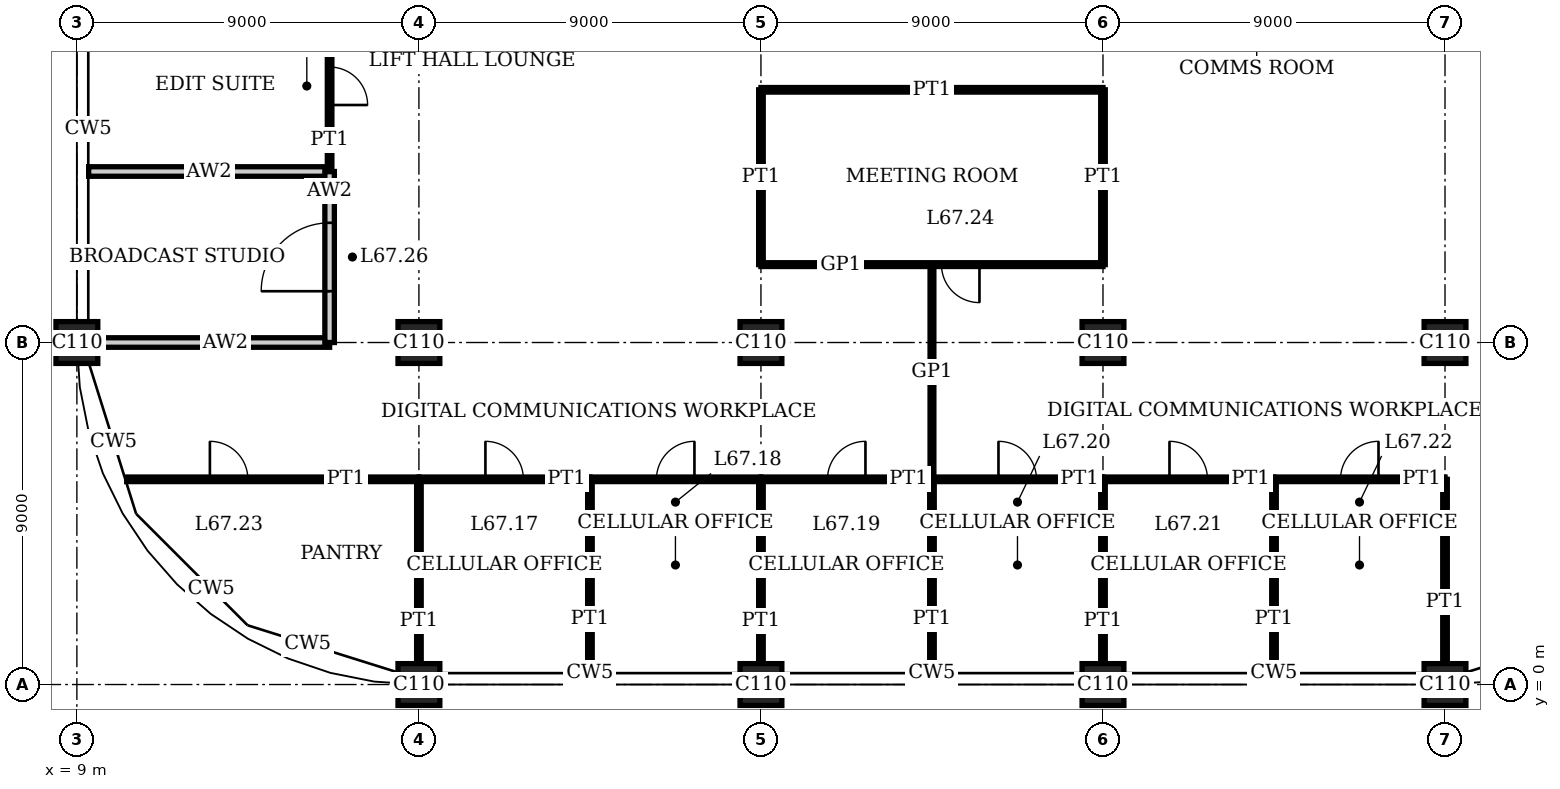
"""IFC4 building model, lengths in metres.
Left out: names, types, materials, properties, quantities, classifications, styles, units other than length and angle.
Written with IfcOpenShell. Run it as: python <this file> out.ifc"""

import sys

from ifc_helpers import new_model, si_unit, direction, frame, frame_2d, origin, origin_2d, place, context, subcontext, project, spatial, rectangle, extrude, element, fill, save


model = new_model("IFC4")
c1 = context("Model", 3, precision=1e-05, world=origin(), true_north=direction((0.0, 1.0)))
c2 = subcontext(c1, "Body", "Model", "MODEL_VIEW")
j1 = project(units=[si_unit("LENGTHUNIT", "METRE"), si_unit("PLANEANGLEUNIT", "RADIAN")], contexts=[c1])
p1 = place(None, origin())
s1 = spatial("IfcSite", under=j1, at=p1, CompositionType="ELEMENT")
p2 = place(p1, origin())
s2 = spatial("IfcBuilding", under=s1, at=p2, CompositionType="ELEMENT")
p3 = place(p2, frame((0.0, 0.0, 275.4)))
s3 = spatial("IfcBuildingStorey", under=s2, at=p3, CompositionType="ELEMENT", Elevation=275.4)
for number, where, z_axis, x_axis in (
    (1, (9.0, 9.0, 0.0), (0.0, 0.0, 1.0), (1.0, 0.0, 0.0)),
    (2, (18.0, 0.0, 0.0), (0.0, 0.0, 1.0), (1.0, 0.0, 0.0)),
    (3, (18.0, 9.0, 0.0), (0.0, 0.0, 1.0), (1.0, 0.0, 0.0)),
    (4, (27.0, 0.0, 0.0), (0.0, 0.0, 1.0), (1.0, 0.0, 0.0)),
    (5, (27.0, 9.0, 0.0), (0.0, 0.0, 1.0), (1.0, 0.0, 0.0)),
    (6, (36.0, 0.0, 0.0), (0.0, 0.0, 1.0), (1.0, 0.0, 0.0)),
    (7, (36.0, 9.0, 0.0), (0.0, 0.0, 1.0), (1.0, 0.0, 0.0)),
    (8, (45.0, 0.0, 0.0), (0.0, 0.0, 1.0), (1.0, 0.0, 0.0)),
    (9, (45.0, 9.0, 0.0), (0.0, 0.0, 1.0), (1.0, 0.0, 0.0)),
):
    element("IfcColumn", number, at=place(p3, frame(where, z_axis=z_axis, x_axis=x_axis)), inside=s3, PredefinedType="COLUMN", context=c2, shape_type="SweptSolid", body=[
        extrude(rectangle(XDim=1.1, YDim=1.1, at=origin_2d()), origin(), (0.0, 0.0, 1.0), 4.0),
    ])
p4 = place(p3, frame((18.0, 5.4, 0.0), z_axis=(0.0, 0.0, 1.0), x_axis=(1.0, 0.0, 0.0)))
e10 = element("IfcWall", 10, at=p4, inside=s3, PredefinedType="PARTITIONING", context=c2, shape_type="SweptSolid", body=[
    extrude(rectangle(XDim=4.5, YDim=0.12, at=frame_2d((2.25, 0.0))), origin(), (0.0, 0.0, 1.0), 3.75),
])
p5 = place(p4, frame((1.75, 0.0, 0.0)))
e11 = element("IfcOpeningElement", 11, at=p5, cuts=e10, PredefinedType="OPENING", context=c2, shape_type="SweptSolid", body=[
    extrude(rectangle(XDim=1.0, YDim=2.4, at=frame_2d((0.5, 1.2))), frame((0.0, 0.07, 0.0), z_axis=(0.0, -1.0, 0.0), x_axis=(1.0, 0.0, 0.0)), (0.0, 0.0, 1.0), 0.14),
])
p6 = place(p3, frame((22.5, 5.4, 0.0), z_axis=(0.0, 0.0, 1.0), x_axis=(1.0, 0.0, 0.0)))
e12 = element("IfcWall", 12, at=p6, inside=s3, PredefinedType="PARTITIONING", context=c2, shape_type="SweptSolid", body=[
    extrude(rectangle(XDim=4.5, YDim=0.12, at=frame_2d((2.25, 0.0))), origin(), (0.0, 0.0, 1.0), 3.75),
])
p7 = place(p6, frame((1.75, 0.0, 0.0)))
e13 = element("IfcOpeningElement", 13, at=p7, cuts=e12, PredefinedType="OPENING", context=c2, shape_type="SweptSolid", body=[
    extrude(rectangle(XDim=1.0, YDim=2.4, at=frame_2d((0.5, 1.2))), frame((0.0, 0.07, 0.0), z_axis=(0.0, -1.0, 0.0), x_axis=(1.0, 0.0, 0.0)), (0.0, 0.0, 1.0), 0.14),
])
p8 = place(p3, frame((27.0, 5.4, 0.0), z_axis=(0.0, 0.0, 1.0), x_axis=(1.0, 0.0, 0.0)))
e14 = element("IfcWall", 14, at=p8, inside=s3, PredefinedType="PARTITIONING", context=c2, shape_type="SweptSolid", body=[
    extrude(rectangle(XDim=4.5, YDim=0.12, at=frame_2d((2.25, 0.0))), origin(), (0.0, 0.0, 1.0), 3.75),
])
p9 = place(p8, frame((1.75, 0.0, 0.0)))
e15 = element("IfcOpeningElement", 15, at=p9, cuts=e14, PredefinedType="OPENING", context=c2, shape_type="SweptSolid", body=[
    extrude(rectangle(XDim=1.0, YDim=2.4, at=frame_2d((0.5, 1.2))), frame((0.0, 0.07, 0.0), z_axis=(0.0, -1.0, 0.0), x_axis=(1.0, 0.0, 0.0)), (0.0, 0.0, 1.0), 0.14),
])
p10 = place(p3, frame((31.5, 5.4, 0.0), z_axis=(0.0, 0.0, 1.0), x_axis=(1.0, 0.0, 0.0)))
e16 = element("IfcWall", 16, at=p10, inside=s3, PredefinedType="PARTITIONING", context=c2, shape_type="SweptSolid", body=[
    extrude(rectangle(XDim=4.5, YDim=0.12, at=frame_2d((2.25, 0.0))), origin(), (0.0, 0.0, 1.0), 3.75),
])
p11 = place(p10, frame((1.75, 0.0, 0.0)))
e17 = element("IfcOpeningElement", 17, at=p11, cuts=e16, PredefinedType="OPENING", context=c2, shape_type="SweptSolid", body=[
    extrude(rectangle(XDim=1.0, YDim=2.4, at=frame_2d((0.5, 1.2))), frame((0.0, 0.07, 0.0), z_axis=(0.0, -1.0, 0.0), x_axis=(1.0, 0.0, 0.0)), (0.0, 0.0, 1.0), 0.14),
])
p12 = place(p3, frame((36.0, 5.4, 0.0), z_axis=(0.0, 0.0, 1.0), x_axis=(1.0, 0.0, 0.0)))
e18 = element("IfcWall", 18, at=p12, inside=s3, PredefinedType="PARTITIONING", context=c2, shape_type="SweptSolid", body=[
    extrude(rectangle(XDim=4.5, YDim=0.12, at=frame_2d((2.25, 0.0))), origin(), (0.0, 0.0, 1.0), 3.75),
])
p13 = place(p12, frame((1.75, 0.0, 0.0)))
e19 = element("IfcOpeningElement", 19, at=p13, cuts=e18, PredefinedType="OPENING", context=c2, shape_type="SweptSolid", body=[
    extrude(rectangle(XDim=1.0, YDim=2.4, at=frame_2d((0.5, 1.2))), frame((0.0, 0.07, 0.0), z_axis=(0.0, -1.0, 0.0), x_axis=(1.0, 0.0, 0.0)), (0.0, 0.0, 1.0), 0.14),
])
p14 = place(p3, frame((40.5, 5.4, 0.0), z_axis=(0.0, 0.0, 1.0), x_axis=(1.0, 0.0, 0.0)))
e20 = element("IfcWall", 20, at=p14, inside=s3, PredefinedType="PARTITIONING", context=c2, shape_type="SweptSolid", body=[
    extrude(rectangle(XDim=4.5, YDim=0.12, at=frame_2d((2.25, 0.0))), origin(), (0.0, 0.0, 1.0), 3.75),
])
p15 = place(p14, frame((1.75, 0.0, 0.0)))
e21 = element("IfcOpeningElement", 21, at=p15, cuts=e20, PredefinedType="OPENING", context=c2, shape_type="SweptSolid", body=[
    extrude(rectangle(XDim=1.0, YDim=2.4, at=frame_2d((0.5, 1.2))), frame((0.0, 0.07, 0.0), z_axis=(0.0, -1.0, 0.0), x_axis=(1.0, 0.0, 0.0)), (0.0, 0.0, 1.0), 0.14),
])
p16 = place(p3, frame((10.31, 5.4, 0.0), z_axis=(0.0, 0.0, 1.0), x_axis=(1.0, 0.0, 0.0)))
e22 = element("IfcWall", 22, at=p16, inside=s3, PredefinedType="PARTITIONING", context=c2, shape_type="SweptSolid", body=[
    extrude(rectangle(XDim=7.69, YDim=0.12, at=frame_2d((3.845, 0.0))), origin(), (0.0, 0.0, 1.0), 3.75),
])
p17 = place(p16, frame((2.19, 0.0, 0.0)))
e23 = element("IfcOpeningElement", 23, at=p17, cuts=e22, PredefinedType="OPENING", context=c2, shape_type="SweptSolid", body=[
    extrude(rectangle(XDim=1.0, YDim=2.4, at=frame_2d((0.5, 1.2))), frame((0.0, 0.07, 0.0), z_axis=(0.0, -1.0, 0.0), x_axis=(1.0, 0.0, 0.0)), (0.0, 0.0, 1.0), 0.14),
])
p18 = place(p3, frame((9.55, 9.0, 0.0), z_axis=(0.0, 0.0, 1.0), x_axis=(1.0, 0.0, 0.0)))
e24 = element("IfcWall", 24, at=p18, inside=s3, PredefinedType="PARTITIONING", context=c2, shape_type="SweptSolid", body=[
    extrude(rectangle(XDim=6.1, YDim=0.25, at=frame_2d((3.05, 0.0))), origin(), (0.0, 0.0, 1.0), 3.05),
])
p19 = place(p3, frame((27.0, 11.05, 0.0), z_axis=(0.0, 0.0, 1.0), x_axis=(1.0, 0.0, 0.0)))
e25 = element("IfcWall", 25, at=p19, inside=s3, PredefinedType="PARTITIONING", context=c2, shape_type="SweptSolid", body=[
    extrude(rectangle(XDim=9.0, YDim=0.1, at=frame_2d((4.5, 0.0))), origin(), (0.0, 0.0, 1.0), 3.75),
])
p20 = place(p19, frame((4.75, 0.0, 0.0)))
e26 = element("IfcOpeningElement", 26, at=p20, cuts=e25, PredefinedType="OPENING", context=c2, shape_type="SweptSolid", body=[
    extrude(rectangle(XDim=1.0, YDim=2.4, at=frame_2d((0.5, 1.2))), frame((0.0, 0.06, 0.0), z_axis=(0.0, -1.0, 0.0), x_axis=(1.0, 0.0, 0.0)), (0.0, 0.0, 1.0), 0.12),
])
p21 = place(p3, frame((9.31, 13.5, 0.0), z_axis=(0.0, 0.0, 1.0), x_axis=(1.0, 0.0, 0.0)))
e27 = element("IfcWall", 27, at=p21, inside=s3, PredefinedType="PARTITIONING", context=c2, shape_type="SweptSolid", body=[
    extrude(rectangle(XDim=6.34, YDim=0.25, at=frame_2d((3.17, 0.0))), origin(), (0.0, 0.0, 1.0), 3.1),
])
p22 = place(p3, frame((27.0, 15.65, 0.0), z_axis=(0.0, 0.0, 1.0), x_axis=(1.0, 0.0, 0.0)))
e28 = element("IfcWall", 28, at=p22, inside=s3, PredefinedType="PARTITIONING", context=c2, shape_type="SweptSolid", body=[
    extrude(rectangle(XDim=9.0, YDim=0.12, at=frame_2d((4.5, 0.0))), origin(), (0.0, 0.0, 1.0), 3.75),
])
p23 = place(p3, frame((15.65, 9.0, 0.0), z_axis=(0.0, 0.0, 1.0), x_axis=(0.0, 1.0, 0.0)))
e29 = element("IfcWall", 29, at=p23, inside=s3, PredefinedType="PARTITIONING", context=c2, shape_type="SweptSolid", body=[
    extrude(rectangle(XDim=4.5, YDim=0.25, at=frame_2d((2.25, 0.0))), origin(), (0.0, 0.0, 1.0), 3.75),
])
p24 = place(p23, frame((1.35, 0.0, 0.0)))
e30 = element("IfcOpeningElement", 30, at=p24, cuts=e29, PredefinedType="OPENING", context=c2, shape_type="SweptSolid", body=[
    extrude(rectangle(XDim=1.8, YDim=2.4, at=frame_2d((0.9, 1.2))), frame((0.0, 0.135, 0.0), z_axis=(0.0, -1.0, 0.0), x_axis=(1.0, 0.0, 0.0)), (0.0, 0.0, 1.0), 0.27),
])
p25 = place(p3, frame((15.65, 13.5, 0.0), z_axis=(0.0, 0.0, 1.0), x_axis=(0.0, 1.0, 0.0)))
e31 = element("IfcWall", 31, at=p25, inside=s3, PredefinedType="PARTITIONING", context=c2, shape_type="SweptSolid", body=[
    extrude(rectangle(XDim=4.5, YDim=0.12, at=frame_2d((2.25, 0.0))), origin(), (0.0, 0.0, 1.0), 3.75),
])
p26 = place(p25, frame((1.75, 0.0, 0.0)))
e32 = element("IfcOpeningElement", 32, at=p26, cuts=e31, PredefinedType="OPENING", context=c2, shape_type="SweptSolid", body=[
    extrude(rectangle(XDim=1.0, YDim=2.4, at=frame_2d((0.5, 1.2))), frame((0.0, 0.07, 0.0), z_axis=(0.0, -1.0, 0.0), x_axis=(1.0, 0.0, 0.0)), (0.0, 0.0, 1.0), 0.14),
])
p27 = place(p3, frame((18.0, 0.55, 0.0), z_axis=(0.0, 0.0, 1.0), x_axis=(0.0, 1.0, 0.0)))
e33 = element("IfcWall", 33, at=p27, inside=s3, PredefinedType="PARTITIONING", context=c2, shape_type="SweptSolid", body=[
    extrude(rectangle(XDim=4.85, YDim=0.12, at=frame_2d((2.425, 0.0))), origin(), (0.0, 0.0, 1.0), 3.05),
])
p28 = place(p3, frame((22.5, 0.31, 0.0), z_axis=(0.0, 0.0, 1.0), x_axis=(0.0, 1.0, 0.0)))
e34 = element("IfcWall", 34, at=p28, inside=s3, PredefinedType="PARTITIONING", context=c2, shape_type="SweptSolid", body=[
    extrude(rectangle(XDim=5.09, YDim=0.12, at=frame_2d((2.545, 0.0))), origin(), (0.0, 0.0, 1.0), 3.75),
])
p29 = place(p3, frame((27.0, 0.55, 0.0), z_axis=(0.0, 0.0, 1.0), x_axis=(0.0, 1.0, 0.0)))
e35 = element("IfcWall", 35, at=p29, inside=s3, PredefinedType="PARTITIONING", context=c2, shape_type="SweptSolid", body=[
    extrude(rectangle(XDim=4.85, YDim=0.12, at=frame_2d((2.425, 0.0))), origin(), (0.0, 0.0, 1.0), 3.05),
])
p30 = place(p3, frame((27.0, 11.05, 0.0), z_axis=(0.0, 0.0, 1.0), x_axis=(0.0, 1.0, 0.0)))
e36 = element("IfcWall", 36, at=p30, inside=s3, PredefinedType="PARTITIONING", context=c2, shape_type="SweptSolid", body=[
    extrude(rectangle(XDim=4.6, YDim=0.12, at=frame_2d((2.3, 0.0))), origin(), (0.0, 0.0, 1.0), 3.05),
])
p31 = place(p3, frame((31.5, 0.31, 0.0), z_axis=(0.0, 0.0, 1.0), x_axis=(0.0, 1.0, 0.0)))
e37 = element("IfcWall", 37, at=p31, inside=s3, PredefinedType="PARTITIONING", context=c2, shape_type="SweptSolid", body=[
    extrude(rectangle(XDim=5.09, YDim=0.12, at=frame_2d((2.545, 0.0))), origin(), (0.0, 0.0, 1.0), 3.75),
])
p32 = place(p3, frame((31.5, 5.4, 0.0), z_axis=(0.0, 0.0, 1.0), x_axis=(0.0, 1.0, 0.0)))
e38 = element("IfcWall", 38, at=p32, inside=s3, PredefinedType="PARTITIONING", context=c2, shape_type="SweptSolid", body=[
    extrude(rectangle(XDim=5.66, YDim=0.1, at=frame_2d((2.83, 0.0))), origin(), (0.0, 0.0, 1.0), 3.75),
])
p33 = place(p3, frame((36.0, 0.55, 0.0), z_axis=(0.0, 0.0, 1.0), x_axis=(0.0, 1.0, 0.0)))
e39 = element("IfcWall", 39, at=p33, inside=s3, PredefinedType="PARTITIONING", context=c2, shape_type="SweptSolid", body=[
    extrude(rectangle(XDim=4.85, YDim=0.12, at=frame_2d((2.425, 0.0))), origin(), (0.0, 0.0, 1.0), 3.05),
])
p34 = place(p3, frame((36.0, 11.05, 0.0), z_axis=(0.0, 0.0, 1.0), x_axis=(0.0, 1.0, 0.0)))
e40 = element("IfcWall", 40, at=p34, inside=s3, PredefinedType="PARTITIONING", context=c2, shape_type="SweptSolid", body=[
    extrude(rectangle(XDim=4.6, YDim=0.12, at=frame_2d((2.3, 0.0))), origin(), (0.0, 0.0, 1.0), 3.05),
])
p35 = place(p3, frame((40.5, 0.31, 0.0), z_axis=(0.0, 0.0, 1.0), x_axis=(0.0, 1.0, 0.0)))
e41 = element("IfcWall", 41, at=p35, inside=s3, PredefinedType="PARTITIONING", context=c2, shape_type="SweptSolid", body=[
    extrude(rectangle(XDim=5.09, YDim=0.12, at=frame_2d((2.545, 0.0))), origin(), (0.0, 0.0, 1.0), 3.75),
])
p36 = place(p3, frame((45.0, 0.55, 0.0), z_axis=(0.0, 0.0, 1.0), x_axis=(0.0, 1.0, 0.0)))
e42 = element("IfcWall", 42, at=p36, inside=s3, PredefinedType="PARTITIONING", context=c2, shape_type="SweptSolid", body=[
    extrude(rectangle(XDim=4.85, YDim=0.12, at=frame_2d((2.425, 0.0))), origin(), (0.0, 0.0, 1.0), 3.05),
])
p37 = place(p5, origin())
e43 = element("IfcDoor", 43, at=p37, inside=s3, OperationType="SINGLE_SWING_RIGHT", PredefinedType="DOOR", context=c2, shape_type="SweptSolid", body=[
    extrude(rectangle(XDim=1.0, YDim=2.4, at=frame_2d((0.5, 1.2))), frame((0.0, 0.025, 0.0), z_axis=(0.0, -1.0, 0.0), x_axis=(1.0, 0.0, 0.0)), (0.0, 0.0, 1.0), 0.05),
])
fill(e11, e43)
p38 = place(p7, origin())
e44 = element("IfcDoor", 44, at=p38, inside=s3, OperationType="SINGLE_SWING_LEFT", PredefinedType="DOOR", context=c2, shape_type="SweptSolid", body=[
    extrude(rectangle(XDim=1.0, YDim=2.4, at=frame_2d((0.5, 1.2))), frame((0.0, 0.025, 0.0), z_axis=(0.0, -1.0, 0.0), x_axis=(1.0, 0.0, 0.0)), (0.0, 0.0, 1.0), 0.05),
])
fill(e13, e44)
p39 = place(p9, origin())
e45 = element("IfcDoor", 45, at=p39, inside=s3, OperationType="SINGLE_SWING_LEFT", PredefinedType="DOOR", context=c2, shape_type="SweptSolid", body=[
    extrude(rectangle(XDim=1.0, YDim=2.4, at=frame_2d((0.5, 1.2))), frame((0.0, 0.025, 0.0), z_axis=(0.0, -1.0, 0.0), x_axis=(1.0, 0.0, 0.0)), (0.0, 0.0, 1.0), 0.05),
])
fill(e15, e45)
p40 = place(p11, origin())
e46 = element("IfcDoor", 46, at=p40, inside=s3, OperationType="SINGLE_SWING_RIGHT", PredefinedType="DOOR", context=c2, shape_type="SweptSolid", body=[
    extrude(rectangle(XDim=1.0, YDim=2.4, at=frame_2d((0.5, 1.2))), frame((0.0, 0.025, 0.0), z_axis=(0.0, -1.0, 0.0), x_axis=(1.0, 0.0, 0.0)), (0.0, 0.0, 1.0), 0.05),
])
fill(e17, e46)
p41 = place(p13, origin())
e47 = element("IfcDoor", 47, at=p41, inside=s3, OperationType="SINGLE_SWING_RIGHT", PredefinedType="DOOR", context=c2, shape_type="SweptSolid", body=[
    extrude(rectangle(XDim=1.0, YDim=2.4, at=frame_2d((0.5, 1.2))), frame((0.0, 0.025, 0.0), z_axis=(0.0, -1.0, 0.0), x_axis=(1.0, 0.0, 0.0)), (0.0, 0.0, 1.0), 0.05),
])
fill(e19, e47)
p42 = place(p15, origin())
e48 = element("IfcDoor", 48, at=p42, inside=s3, OperationType="SINGLE_SWING_LEFT", PredefinedType="DOOR", context=c2, shape_type="SweptSolid", body=[
    extrude(rectangle(XDim=1.0, YDim=2.4, at=frame_2d((0.5, 1.2))), frame((0.0, 0.025, 0.0), z_axis=(0.0, -1.0, 0.0), x_axis=(1.0, 0.0, 0.0)), (0.0, 0.0, 1.0), 0.05),
])
fill(e21, e48)
p43 = place(p17, origin())
e49 = element("IfcDoor", 49, at=p43, inside=s3, OperationType="SINGLE_SWING_RIGHT", PredefinedType="DOOR", context=c2, shape_type="SweptSolid", body=[
    extrude(rectangle(XDim=1.0, YDim=2.4, at=frame_2d((0.5, 1.2))), frame((0.0, 0.025, 0.0), z_axis=(0.0, -1.0, 0.0), x_axis=(1.0, 0.0, 0.0)), (0.0, 0.0, 1.0), 0.05),
])
fill(e23, e49)
p44 = place(p20, origin())
e50 = element("IfcDoor", 50, at=p44, inside=s3, OperationType="SINGLE_SWING_RIGHT", PredefinedType="DOOR", context=c2, shape_type="SweptSolid", body=[
    extrude(rectangle(XDim=1.0, YDim=2.4, at=frame_2d((0.5, 1.2))), frame((0.0, 0.02, 0.0), z_axis=(0.0, -1.0, 0.0), x_axis=(1.0, 0.0, 0.0)), (0.0, 0.0, 1.0), 0.04),
])
fill(e26, e50)
p45 = place(p24, origin())
e51 = element("IfcDoor", 51, at=p45, inside=s3, OperationType="DOUBLE_DOOR_SINGLE_SWING", PredefinedType="DOOR", context=c2, shape_type="SweptSolid", body=[
    extrude(rectangle(XDim=1.8, YDim=2.4, at=frame_2d((0.9, 1.2))), frame((0.0, 0.025, 0.0), z_axis=(0.0, -1.0, 0.0), x_axis=(1.0, 0.0, 0.0)), (0.0, 0.0, 1.0), 0.05),
])
fill(e30, e51)
p46 = place(p26, origin())
e52 = element("IfcDoor", 52, at=p46, inside=s3, OperationType="SINGLE_SWING_LEFT", PredefinedType="DOOR", context=c2, shape_type="SweptSolid", body=[
    extrude(rectangle(XDim=1.0, YDim=2.4, at=frame_2d((0.5, 1.2))), frame((0.0, 0.025, 0.0), z_axis=(0.0, -1.0, 0.0), x_axis=(1.0, 0.0, 0.0)), (0.0, 0.0, 1.0), 0.05),
])
fill(e32, e52)
save(model, sys.argv[1])
